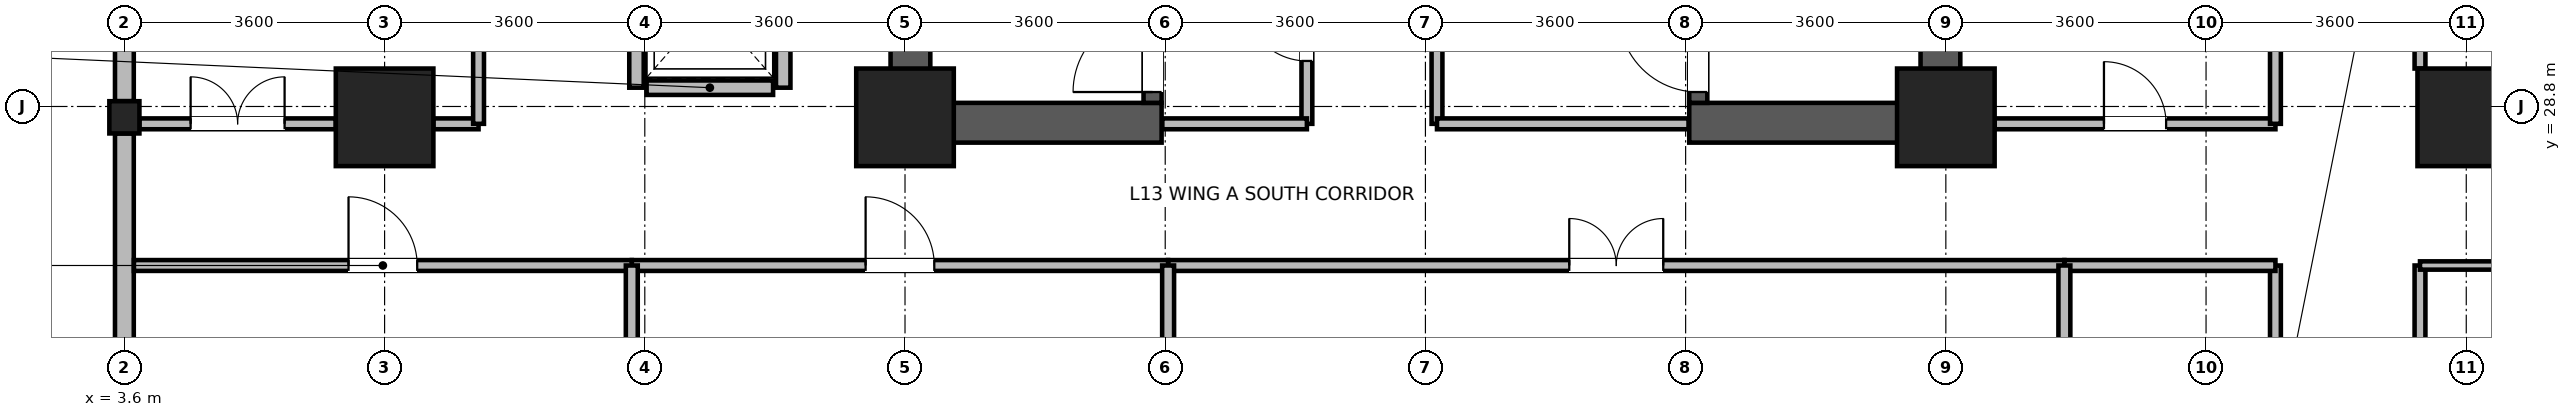
"""IFC4 building model, lengths in metres.
Left out: names, types, materials, properties, quantities, classifications, styles, units other than length and angle.
Written with IfcOpenShell. Run it as: python <this file> out.ifc"""

import sys

from ifc_helpers import new_model, si_unit, direction, frame, frame_2d, origin, origin_2d, place, context, subcontext, project, spatial, rectangle, i_section, extrude, source, transform, mapped, element, fill, save


model = new_model("IFC4")
c1 = context("Model", 3, precision=1e-05, world=origin(), true_north=direction((0.0, 1.0)))
c2 = subcontext(c1, "Body", "Model", "MODEL_VIEW")
j1 = project(units=[si_unit("LENGTHUNIT", "METRE"), si_unit("PLANEANGLEUNIT", "RADIAN")], contexts=[c1])
p1 = place(None, origin())
s1 = spatial("IfcSite", under=j1, at=p1, CompositionType="ELEMENT")
p2 = place(p1, origin())
s2 = spatial("IfcBuilding", under=s1, at=p2, CompositionType="ELEMENT")
p3 = place(p2, frame((0.0, 0.0, 54.9)))
s3 = spatial("IfcBuildingStorey", under=s2, at=p3, CompositionType="ELEMENT", Elevation=54.9)
for number, where, z_axis, x_axis in (
    (1, (14.475, 28.3, 0.0), (0.0, 0.0, 1.0), (0.0, 1.0, 0.0)),
    (2, (28.725, 28.3, 0.0), (0.0, 0.0, 1.0), (0.0, 1.0, 0.0)),
):
    element("IfcWall", number, at=place(p3, frame(where, z_axis=z_axis, x_axis=x_axis)), inside=s3, PredefinedType="SHEAR", context=c2, shape_type="SweptSolid", body=[
        extrude(rectangle(XDim=8.1, YDim=0.55, at=frame_2d((4.05, 0.0))), origin(), (0.0, 0.0, 1.0), 3.45),
    ])
for number, where, z_axis, x_axis in (
    (3, (14.75, 28.575, 0.0), (0.0, 0.0, 1.0), (1.0, 0.0, 0.0)),
    (4, (25.25, 28.575, 0.0), (0.0, 0.0, 1.0), (1.0, 0.0, 0.0)),
):
    element("IfcWall", number, at=place(p3, frame(where, z_axis=z_axis, x_axis=x_axis)), inside=s3, PredefinedType="SHEAR", context=c2, shape_type="SweptSolid", body=[
        extrude(rectangle(XDim=3.2, YDim=0.55, at=frame_2d((1.6, 0.0))), origin(), (0.0, 0.0, 1.0), 3.45),
    ])
p4 = place(p3, frame((17.825, 28.85, 0.0), z_axis=(0.0, 0.0, 1.0), x_axis=(0.0, 1.0, 0.0)))
e5 = element("IfcWall", 5, at=p4, inside=s3, PredefinedType="SHEAR", context=c2, shape_type="SweptSolid", body=[
    extrude(rectangle(XDim=7.0, YDim=0.25, at=frame_2d((3.5, 0.0))), origin(), (0.0, 0.0, 1.0), 3.45),
])
p5 = place(p4, frame((0.15, 0.0, 0.0)))
e6 = element("IfcOpeningElement", 6, at=p5, cuts=e5, PredefinedType="OPENING", context=c2, shape_type="SweptSolid", body=[
    extrude(rectangle(XDim=1.1, YDim=2.08, at=frame_2d((0.55, 1.04))), frame((0.0, 0.135, 0.0), z_axis=(0.0, -1.0, 0.0), x_axis=(1.0, 0.0, 0.0)), (0.0, 0.0, 1.0), 0.27),
])
p6 = place(p3, frame((25.375, 28.85, 0.0), z_axis=(0.0, 0.0, 1.0), x_axis=(0.0, 1.0, 0.0)))
e7 = element("IfcWall", 7, at=p6, inside=s3, PredefinedType="SHEAR", context=c2, shape_type="SweptSolid", body=[
    extrude(rectangle(XDim=7.0, YDim=0.25, at=frame_2d((3.5, 0.0))), origin(), (0.0, 0.0, 1.0), 3.45),
])
p7 = place(p6, frame((0.15, 0.0, 0.0)))
e8 = element("IfcOpeningElement", 8, at=p7, cuts=e7, PredefinedType="OPENING", context=c2, shape_type="SweptSolid", body=[
    extrude(rectangle(XDim=1.1, YDim=2.08, at=frame_2d((0.55, 1.04))), frame((0.0, 0.135, 0.0), z_axis=(0.0, -1.0, 0.0), x_axis=(1.0, 0.0, 0.0)), (0.0, 0.0, 1.0), 0.27),
])
m1 = source(origin(), c2, "Body", "SweptSolid", [
    extrude(rectangle(XDim=1.35, YDim=1.35, at=origin_2d()), origin(), (0.0, 0.0, 1.0), 3.7),
])
for number, where, z_axis, x_axis in (
    (9, (7.2, 28.65, 0.0), (0.0, 0.0, 1.0), (1.0, 0.0, 0.0)),
    (10, (14.4, 28.65, 0.0), (0.0, 0.0, 1.0), (1.0, 0.0, 0.0)),
    (11, (28.8, 28.65, 0.0), (0.0, 0.0, 1.0), (1.0, 0.0, 0.0)),
    (12, (36.0, 28.65, 0.0), (0.0, 0.0, 1.0), (1.0, 0.0, 0.0)),
):
    element("IfcColumn", number, at=place(p3, frame(where, z_axis=z_axis, x_axis=x_axis)), inside=s3, PredefinedType="COLUMN", context=c2, shape_type="MappedRepresentation", body=[
        mapped(m1, transform((0.0, 0.0, 0.0), x_axis=(1.0, 0.0, 0.0), y_axis=(0.0, 1.0, 0.0), z_axis=(0.0, 0.0, 1.0), scale=1.0)),
    ])
m2 = source(origin(), c2, "Body", "SweptSolid", [
    extrude(i_section(OverallWidth=0.416, OverallDepth=0.446, WebThickness=0.029, FlangeThickness=0.04, FilletRadius=0.015, at=origin_2d()), origin(), (0.0, 0.0, 1.0), 3.7),
])
p8 = place(p3, frame((3.6, 28.65, 0.0), z_axis=(0.0, 0.0, 1.0), x_axis=(1.0, 0.0, 0.0)))
e13 = element("IfcColumn", 13, at=p8, inside=s3, PredefinedType="COLUMN", context=c2, shape_type="MappedRepresentation", body=[
    mapped(m2, transform((0.0, 0.0, 0.0), x_axis=(1.0, 0.0, 0.0), y_axis=(0.0, 1.0, 0.0), z_axis=(0.0, 0.0, 1.0), scale=1.0)),
])
p9 = place(p3, frame((3.6, 28.874, 0.0), z_axis=(0.0, 0.0, 1.0), x_axis=(0.0, 1.0, 0.0)))
e14 = element("IfcWall", 14, at=p9, inside=s3, PredefinedType="STANDARD", context=c2, shape_type="SweptSolid", body=[
    extrude(rectangle(XDim=7.052, YDim=0.26, at=frame_2d((3.526, 0.0))), origin(), (0.0, 0.0, 1.0), 2.93),
])
p10 = place(p9, frame((1.013, 0.0, 0.85)))
e15 = element("IfcOpeningElement", 15, at=p10, cuts=e14, PredefinedType="OPENING", context=c2, shape_type="SweptSolid", body=[
    extrude(rectangle(XDim=1.5, YDim=1.85, at=frame_2d((0.75, 0.925))), frame((0.0, 0.14, 0.0), z_axis=(0.0, -1.0, 0.0), x_axis=(1.0, 0.0, 0.0)), (0.0, 0.0, 1.0), 0.28),
])
p11 = place(p9, frame((4.539, 0.0, 0.85)))
e16 = element("IfcOpeningElement", 16, at=p11, cuts=e14, PredefinedType="OPENING", context=c2, shape_type="SweptSolid", body=[
    extrude(rectangle(XDim=1.5, YDim=1.85, at=frame_2d((0.75, 0.925))), frame((0.0, 0.14, 0.0), z_axis=(0.0, -1.0, 0.0), x_axis=(1.0, 0.0, 0.0)), (0.0, 0.0, 1.0), 0.28),
])
p12 = place(p3, frame((3.6, 21.47, 0.0), z_axis=(0.0, 0.0, 1.0), x_axis=(0.0, 1.0, 0.0)))
e17 = element("IfcWall", 17, at=p12, inside=s3, PredefinedType="STANDARD", context=c2, shape_type="SweptSolid", body=[
    extrude(rectangle(XDim=6.956, YDim=0.26, at=frame_2d((3.478, 0.0))), origin(), (0.0, 0.0, 1.0), 3.43),
])
p13 = place(p12, frame((0.989, 0.0, 0.85)))
e18 = element("IfcOpeningElement", 18, at=p13, cuts=e17, PredefinedType="OPENING", context=c2, shape_type="SweptSolid", body=[
    extrude(rectangle(XDim=1.5, YDim=1.85, at=frame_2d((0.75, 0.925))), frame((0.0, 0.14, 0.0), z_axis=(0.0, -1.0, 0.0), x_axis=(1.0, 0.0, 0.0)), (0.0, 0.0, 1.0), 0.28),
])
p14 = place(p12, frame((3.003, 0.0, 0.85)))
e19 = element("IfcOpeningElement", 19, at=p14, cuts=e17, PredefinedType="OPENING", context=c2, shape_type="SweptSolid", body=[
    extrude(rectangle(XDim=0.95, YDim=1.75, at=frame_2d((0.475, 0.875))), frame((0.0, 0.14, 0.0), z_axis=(0.0, -1.0, 0.0), x_axis=(1.0, 0.0, 0.0)), (0.0, 0.0, 1.0), 0.28),
])
p15 = place(p3, frame((10.825, 29.06, 0.0), z_axis=(0.0, 0.0, 1.0), x_axis=(1.0, 0.0, 0.0)))
e20 = element("IfcWall", 20, at=p15, inside=s3, PredefinedType="PARTITIONING", context=c2, shape_type="SweptSolid", body=[
    extrude(rectangle(XDim=1.75, YDim=0.2, at=frame_2d((0.875, 0.0))), origin(), (0.0, 0.0, 1.0), 3.43),
])
for number, where, z_axis, x_axis in (
    (21, (10.685, 29.06, 0.0), (0.0, 0.0, 1.0), (0.0, 1.0, 0.0)),
    (22, (12.715, 29.06, 0.0), (0.0, 0.0, 1.0), (0.0, 1.0, 0.0)),
):
    element("IfcWall", number, at=place(p3, frame(where, z_axis=z_axis, x_axis=x_axis)), inside=s3, PredefinedType="PARTITIONING", context=c2, shape_type="SweptSolid", body=[
        extrude(rectangle(XDim=2.28, YDim=0.2, at=frame_2d((1.14, 0.0))), origin(), (0.0, 0.0, 1.0), 3.43),
    ])
p16 = place(p3, frame((18.04, 26.6, 0.0), z_axis=(0.0, 0.0, 1.0), x_axis=(1.0, 0.0, 0.0)))
e23 = element("IfcWall", 23, at=p16, inside=s3, PredefinedType="PARTITIONING", context=c2, shape_type="SweptSolid", body=[
    extrude(rectangle(XDim=12.4, YDim=0.15, at=frame_2d((6.2, 0.0))), origin(), (0.0, 0.0, 1.0), 3.43),
])
p17 = place(p16, frame((5.55, 0.0, 0.0)))
e24 = element("IfcOpeningElement", 24, at=p17, cuts=e23, PredefinedType="OPENING", context=c2, shape_type="SweptSolid", body=[
    extrude(rectangle(XDim=1.3, YDim=2.12, at=frame_2d((0.65, 1.06))), frame((0.0, 0.085, 0.0), z_axis=(0.0, -1.0, 0.0), x_axis=(1.0, 0.0, 0.0)), (0.0, 0.0, 1.0), 0.17),
])
p18 = place(p3, frame((35.36, 22.275, 0.0), z_axis=(0.0, 0.0, 1.0), x_axis=(0.0, 1.0, 0.0)))
e25 = element("IfcWall", 25, at=p18, inside=s3, PredefinedType="PARTITIONING", context=c2, shape_type="SweptSolid", body=[
    extrude(rectangle(XDim=4.325, YDim=0.15, at=frame_2d((2.163, 0.0))), origin(), (0.0, 0.0, 1.0), 3.43),
])
p19 = place(p3, frame((35.36, 29.325, 0.0), z_axis=(0.0, 0.0, 1.0), x_axis=(0.0, 1.0, 0.0)))
e26 = element("IfcWall", 26, at=p19, inside=s3, PredefinedType="PARTITIONING", context=c2, shape_type="SweptSolid", body=[
    extrude(rectangle(XDim=6.15, YDim=0.15, at=frame_2d((3.075, 0.0))), origin(), (0.0, 0.0, 1.0), 3.43),
])
p20 = place(p19, frame((2.425, 0.0, 0.0)))
e27 = element("IfcOpeningElement", 27, at=p20, cuts=e26, PredefinedType="OPENING", context=c2, shape_type="SweptSolid", body=[
    extrude(rectangle(XDim=1.3, YDim=2.12, at=frame_2d((0.65, 1.06))), frame((0.0, 0.085, 0.0), z_axis=(0.0, -1.0, 0.0), x_axis=(1.0, 0.0, 0.0)), (0.0, 0.0, 1.0), 0.17),
])
p21 = place(p3, frame((10.62, 26.6, 0.0), z_axis=(0.0, 0.0, 1.0), x_axis=(1.0, 0.0, 0.0)))
e28 = element("IfcWall", 28, at=p21, inside=s3, PredefinedType="PARTITIONING", context=c2, shape_type="SweptSolid", body=[
    extrude(rectangle(XDim=7.42, YDim=0.15, at=frame_2d((3.71, 0.0))), origin(), (0.0, 0.0, 1.0), 3.43),
])
p22 = place(p21, frame((3.235, 0.0, 0.0)))
e29 = element("IfcOpeningElement", 29, at=p22, cuts=e28, PredefinedType="OPENING", context=c2, shape_type="SweptSolid", body=[
    extrude(rectangle(XDim=0.95, YDim=2.1, at=frame_2d((0.475, 1.05))), frame((0.0, 0.085, 0.0), z_axis=(0.0, -1.0, 0.0), x_axis=(1.0, 0.0, 0.0)), (0.0, 0.0, 1.0), 0.17),
])
p23 = place(p3, frame((3.732, 26.6, 0.0), z_axis=(0.0, 0.0, 1.0), x_axis=(1.0, 0.0, 0.0)))
e30 = element("IfcWall", 30, at=p23, inside=s3, PredefinedType="PARTITIONING", context=c2, shape_type="SweptSolid", body=[
    extrude(rectangle(XDim=6.888, YDim=0.15, at=frame_2d((3.444, 0.0))), origin(), (0.0, 0.0, 1.0), 3.43),
])
p24 = place(p23, frame((2.969, 0.0, 0.0)))
e31 = element("IfcOpeningElement", 31, at=p24, cuts=e30, PredefinedType="OPENING", context=c2, shape_type="SweptSolid", body=[
    extrude(rectangle(XDim=0.95, YDim=2.1, at=frame_2d((0.475, 1.05))), frame((0.0, 0.085, 0.0), z_axis=(0.0, -1.0, 0.0), x_axis=(1.0, 0.0, 0.0)), (0.0, 0.0, 1.0), 0.17),
])
p25 = place(p3, frame((33.36, 21.6, 0.0), z_axis=(0.0, 0.0, 1.0), x_axis=(0.0, 1.0, 0.0)))
e32 = element("IfcWall", 32, at=p25, inside=s3, PredefinedType="PARTITIONING", context=c2, shape_type="SweptSolid", body=[
    extrude(rectangle(XDim=5.0, YDim=0.15, at=frame_2d((2.5, 0.0))), origin(), (0.0, 0.0, 1.0), 3.43),
])
p26 = place(p25, frame((2.07, 0.0, 0.0)))
e33 = element("IfcOpeningElement", 33, at=p26, cuts=e32, PredefinedType="OPENING", context=c2, shape_type="SweptSolid", body=[
    extrude(rectangle(XDim=0.86, YDim=2.02, at=frame_2d((0.43, 1.01))), frame((0.0, 0.085, 0.0), z_axis=(0.0, -1.0, 0.0), x_axis=(1.0, 0.0, 0.0)), (0.0, 0.0, 1.0), 0.17),
])
p27 = place(p3, frame((3.808, 28.56, 0.0), z_axis=(0.0, 0.0, 1.0), x_axis=(1.0, 0.0, 0.0)))
e34 = element("IfcWall", 34, at=p27, inside=s3, PredefinedType="PARTITIONING", context=c2, shape_type="SweptSolid", body=[
    extrude(rectangle(XDim=2.717, YDim=0.15, at=frame_2d((1.358, 0.0))), origin(), (0.0, 0.0, 1.0), 2.78),
])
p28 = place(p27, frame((0.708, 0.0, 0.0)))
e35 = element("IfcOpeningElement", 35, at=p28, cuts=e34, PredefinedType="OPENING", context=c2, shape_type="SweptSolid", body=[
    extrude(rectangle(XDim=1.3, YDim=2.12, at=frame_2d((0.65, 1.06))), frame((0.0, 0.085, 0.0), z_axis=(0.0, -1.0, 0.0), x_axis=(1.0, 0.0, 0.0)), (0.0, 0.0, 1.0), 0.17),
])
p29 = place(p3, frame((7.875, 28.56, 0.0), z_axis=(0.0, 0.0, 1.0), x_axis=(1.0, 0.0, 0.0)))
e36 = element("IfcWall", 36, at=p29, inside=s3, PredefinedType="PARTITIONING", context=c2, shape_type="SweptSolid", body=[
    extrude(rectangle(XDim=0.625, YDim=0.15, at=frame_2d((0.312, 0.0))), origin(), (0.0, 0.0, 1.0), 2.78),
])
p30 = place(p3, frame((29.475, 28.56, 0.0), z_axis=(0.0, 0.0, 1.0), x_axis=(1.0, 0.0, 0.0)))
e37 = element("IfcWall", 37, at=p30, inside=s3, PredefinedType="PARTITIONING", context=c2, shape_type="SweptSolid", body=[
    extrude(rectangle(XDim=3.885, YDim=0.15, at=frame_2d((1.942, 0.0))), origin(), (0.0, 0.0, 1.0), 2.78),
])
p31 = place(p30, frame((1.512, 0.0, 0.0)))
e38 = element("IfcOpeningElement", 38, at=p31, cuts=e37, PredefinedType="OPENING", context=c2, shape_type="SweptSolid", body=[
    extrude(rectangle(XDim=0.86, YDim=2.02, at=frame_2d((0.43, 1.01))), frame((0.0, 0.085, 0.0), z_axis=(0.0, -1.0, 0.0), x_axis=(1.0, 0.0, 0.0)), (0.0, 0.0, 1.0), 0.17),
])
for number, where, z_axis, x_axis in (
    (39, (8.5, 28.56, 0.0), (0.0, 0.0, 1.0), (0.0, 1.0, 0.0)),
    (40, (33.36, 28.56, 0.0), (0.0, 0.0, 1.0), (0.0, 1.0, 0.0)),
):
    element("IfcWall", number, at=place(p3, frame(where, z_axis=z_axis, x_axis=x_axis)), inside=s3, PredefinedType="PARTITIONING", context=c2, shape_type="SweptSolid", body=[
        extrude(rectangle(XDim=3.84, YDim=0.15, at=frame_2d((1.92, 0.0))), origin(), (0.0, 0.0, 1.0), 3.43),
    ])
p32 = place(p3, frame((30.44, 26.6, 0.0), z_axis=(0.0, 0.0, 1.0), x_axis=(1.0, 0.0, 0.0)))
e41 = element("IfcWall", 41, at=p32, inside=s3, PredefinedType="PARTITIONING", context=c2, shape_type="SweptSolid", body=[
    extrude(rectangle(XDim=2.92, YDim=0.15, at=frame_2d((1.46, 0.0))), origin(), (0.0, 0.0, 1.0), 3.43),
])
p33 = place(p3, frame((19.96, 28.56, 0.0), z_axis=(0.0, 0.0, 1.0), x_axis=(0.0, 1.0, 0.0)))
e42 = element("IfcWall", 42, at=p33, inside=s3, PredefinedType="PARTITIONING", context=c2, shape_type="SweptSolid", body=[
    extrude(rectangle(XDim=2.6, YDim=0.15, at=frame_2d((1.3, 0.0))), origin(), (0.0, 0.0, 1.0), 3.43),
])
p34 = place(p33, frame((0.87, 0.0, 0.0)))
e43 = element("IfcOpeningElement", 43, at=p34, cuts=e42, PredefinedType="OPENING", context=c2, shape_type="SweptSolid", body=[
    extrude(rectangle(XDim=0.86, YDim=2.02, at=frame_2d((0.43, 1.01))), frame((0.0, 0.085, 0.0), z_axis=(0.0, -1.0, 0.0), x_axis=(1.0, 0.0, 0.0)), (0.0, 0.0, 1.0), 0.17),
])
p35 = place(p3, frame((17.96, 28.56, 0.0), z_axis=(0.0, 0.0, 1.0), x_axis=(1.0, 0.0, 0.0)))
e44 = element("IfcWall", 44, at=p35, inside=s3, PredefinedType="PARTITIONING", context=c2, shape_type="SweptSolid", body=[
    extrude(rectangle(XDim=2.0, YDim=0.15, at=frame_2d((1.0, 0.0))), origin(), (0.0, 0.0, 1.0), 2.23),
])
p36 = place(p3, frame((35.36, 26.6, 0.0), z_axis=(0.0, 0.0, 1.0), x_axis=(1.0, 0.0, 0.0)))
e45 = element("IfcWall", 45, at=p36, inside=s3, PredefinedType="PARTITIONING", context=c2, shape_type="SweptSolid", body=[
    extrude(rectangle(XDim=7.42, YDim=0.115, at=frame_2d((3.71, 0.0))), origin(), (0.0, 0.0, 1.0), 3.43),
])
p37 = place(p3, frame((18.04, 21.732, 0.0), z_axis=(0.0, 0.0, 1.0), x_axis=(0.0, 1.0, 0.0)))
e46 = element("IfcWall", 46, at=p37, inside=s3, PredefinedType="PARTITIONING", context=c2, shape_type="SweptSolid", body=[
    extrude(rectangle(XDim=4.868, YDim=0.165, at=frame_2d((2.434, 0.0))), origin(), (0.0, 0.0, 1.0), 3.07),
])
p38 = place(p3, frame((30.44, 21.6, 0.0), z_axis=(0.0, 0.0, 1.0), x_axis=(0.0, 1.0, 0.0)))
e47 = element("IfcWall", 47, at=p38, inside=s3, PredefinedType="PARTITIONING", context=c2, shape_type="SweptSolid", body=[
    extrude(rectangle(XDim=5.0, YDim=0.165, at=frame_2d((2.5, 0.0))), origin(), (0.0, 0.0, 1.0), 3.43),
])
p39 = place(p3, frame((21.76, 28.56, 0.0), z_axis=(0.0, 0.0, 1.0), x_axis=(0.0, 1.0, 0.0)))
e48 = element("IfcWall", 48, at=p39, inside=s3, PredefinedType="PARTITIONING", context=c2, shape_type="SweptSolid", body=[
    extrude(rectangle(XDim=4.6, YDim=0.15, at=frame_2d((2.3, 0.0))), origin(), (0.0, 0.0, 1.0), 3.43),
])
p40 = place(p39, frame((1.55, 0.0, 0.0)))
e49 = element("IfcOpeningElement", 49, at=p40, cuts=e48, PredefinedType="OPENING", context=c2, shape_type="SweptSolid", body=[
    extrude(rectangle(XDim=1.5, YDim=2.1, at=frame_2d((0.75, 1.05))), frame((0.0, 0.085, 0.0), z_axis=(0.0, -1.0, 0.0), x_axis=(1.0, 0.0, 0.0)), (0.0, 0.0, 1.0), 0.17),
])
p41 = place(p3, frame((21.76, 28.56, 0.0), z_axis=(0.0, 0.0, 1.0), x_axis=(1.0, 0.0, 0.0)))
e50 = element("IfcWall", 50, at=p41, inside=s3, PredefinedType="PARTITIONING", context=c2, shape_type="SweptSolid", body=[
    extrude(rectangle(XDim=3.48, YDim=0.15, at=frame_2d((1.74, 0.0))), origin(), (0.0, 0.0, 1.0), 2.23),
])
p42 = place(p3, frame((10.62, 23.5, 0.0), z_axis=(0.0, 0.0, 1.0), x_axis=(0.0, 1.0, 0.0)))
e51 = element("IfcWall", 51, at=p42, inside=s3, PredefinedType="PARTITIONING", context=c2, shape_type="SweptSolid", body=[
    extrude(rectangle(XDim=3.1, YDim=0.165, at=frame_2d((1.55, 0.0))), origin(), (0.0, 0.0, 1.0), 3.43),
])
p43 = place(p5, origin())
e52 = element("IfcDoor", 52, at=p43, inside=s3, OperationType="SINGLE_SWING_LEFT", PredefinedType="DOOR", context=c2, shape_type="SweptSolid", body=[
    extrude(rectangle(XDim=1.1, YDim=2.08, at=frame_2d((0.55, 1.04))), frame((0.0, 0.025, 0.0), z_axis=(0.0, -1.0, 0.0), x_axis=(1.0, 0.0, 0.0)), (0.0, 0.0, 1.0), 0.05),
])
fill(e6, e52)
p44 = place(p7, origin())
e53 = element("IfcDoor", 53, at=p44, inside=s3, OperationType="SINGLE_SWING_RIGHT", PredefinedType="DOOR", context=c2, shape_type="SweptSolid", body=[
    extrude(rectangle(XDim=1.1, YDim=2.08, at=frame_2d((0.55, 1.04))), frame((0.0, 0.025, 0.0), z_axis=(0.0, -1.0, 0.0), x_axis=(1.0, 0.0, 0.0)), (0.0, 0.0, 1.0), 0.05),
])
fill(e8, e53)
p45 = place(p17, origin())
e54 = element("IfcDoor", 54, at=p45, inside=s3, OperationType="DOUBLE_DOOR_SINGLE_SWING", PredefinedType="DOOR", context=c2, shape_type="SweptSolid", body=[
    extrude(rectangle(XDim=1.3, YDim=2.12, at=frame_2d((0.65, 1.06))), frame((0.0, 0.025, 0.0), z_axis=(0.0, -1.0, 0.0), x_axis=(1.0, 0.0, 0.0)), (0.0, 0.0, 1.0), 0.05),
])
fill(e24, e54)
p46 = place(p22, origin())
e55 = element("IfcDoor", 55, at=p46, inside=s3, OperationType="SINGLE_SWING_LEFT", PredefinedType="DOOR", context=c2, shape_type="SweptSolid", body=[
    extrude(rectangle(XDim=0.95, YDim=2.1, at=frame_2d((0.475, 1.05))), frame((0.0, 0.025, 0.0), z_axis=(0.0, -1.0, 0.0), x_axis=(1.0, 0.0, 0.0)), (0.0, 0.0, 1.0), 0.05),
])
fill(e29, e55)
p47 = place(p24, origin())
e56 = element("IfcDoor", 56, at=p47, inside=s3, OperationType="SINGLE_SWING_LEFT", PredefinedType="DOOR", context=c2, shape_type="SweptSolid", body=[
    extrude(rectangle(XDim=0.95, YDim=2.1, at=frame_2d((0.475, 1.05))), frame((0.0, 0.025, 0.0), z_axis=(0.0, -1.0, 0.0), x_axis=(1.0, 0.0, 0.0)), (0.0, 0.0, 1.0), 0.05),
])
fill(e31, e56)
p48 = place(p28, origin())
e57 = element("IfcDoor", 57, at=p48, inside=s3, OperationType="DOUBLE_DOOR_SINGLE_SWING", PredefinedType="DOOR", context=c2, shape_type="SweptSolid", body=[
    extrude(rectangle(XDim=1.3, YDim=2.12, at=frame_2d((0.65, 1.06))), frame((0.0, 0.025, 0.0), z_axis=(0.0, -1.0, 0.0), x_axis=(1.0, 0.0, 0.0)), (0.0, 0.0, 1.0), 0.05),
])
fill(e35, e57)
p49 = place(p31, origin())
e58 = element("IfcDoor", 58, at=p49, inside=s3, OperationType="SINGLE_SWING_LEFT", PredefinedType="DOOR", context=c2, shape_type="SweptSolid", body=[
    extrude(rectangle(XDim=0.86, YDim=2.02, at=frame_2d((0.43, 1.01))), frame((0.0, 0.025, 0.0), z_axis=(0.0, -1.0, 0.0), x_axis=(1.0, 0.0, 0.0)), (0.0, 0.0, 1.0), 0.05),
])
fill(e38, e58)
p50 = place(p34, origin())
e59 = element("IfcDoor", 59, at=p50, inside=s3, OperationType="SINGLE_SWING_RIGHT", PredefinedType="DOOR", context=c2, shape_type="SweptSolid", body=[
    extrude(rectangle(XDim=0.86, YDim=2.02, at=frame_2d((0.43, 1.01))), frame((0.0, 0.025, 0.0), z_axis=(0.0, -1.0, 0.0), x_axis=(1.0, 0.0, 0.0)), (0.0, 0.0, 1.0), 0.05),
])
fill(e43, e59)
save(model, sys.argv[1])
